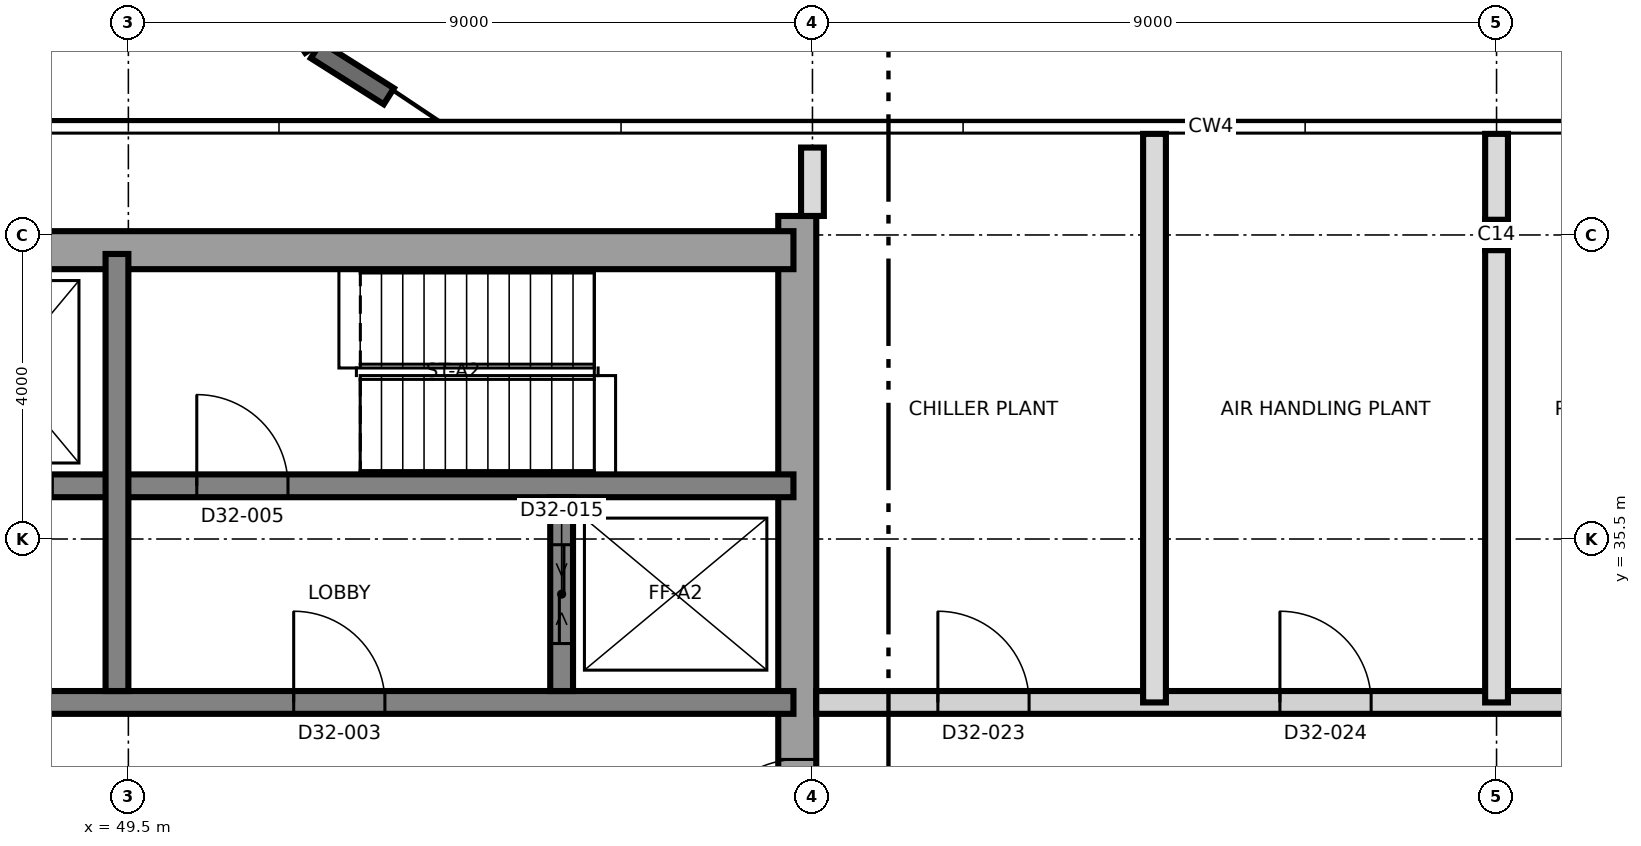
"""IFC4 building model, lengths in metres.
Left out: names, types, materials, properties, quantities, classifications, styles, units other than length and angle.
Written with IfcOpenShell. Run it as: python <this file> out.ifc"""

import sys

from ifc_helpers import new_model, si_unit, direction, frame, frame_2d, origin, origin_2d, place, context, subcontext, project, spatial, rectangle, i_section, extrude, element, fill, save


model = new_model("IFC4")
c1 = context("Model", 3, precision=1e-05, world=origin(), true_north=direction((0.0, 1.0)))
c2 = subcontext(c1, "Body", "Model", "MODEL_VIEW")
j1 = project(units=[si_unit("LENGTHUNIT", "METRE"), si_unit("PLANEANGLEUNIT", "RADIAN")], contexts=[c1])
p1 = place(None, origin())
s1 = spatial("IfcSite", under=j1, at=p1, CompositionType="ELEMENT")
p2 = place(p1, origin())
s2 = spatial("IfcBuilding", under=s1, at=p2, CompositionType="ELEMENT")
p3 = place(p2, frame((0.0, 0.0, 272.9)))
s3 = spatial("IfcBuildingStorey", under=s2, at=p3, CompositionType="ELEMENT", Elevation=272.9)
p4 = place(p3, frame((58.3, 21.25, 0.0), z_axis=(0.0, 0.0, 1.0), x_axis=(0.0, 1.0, 0.0)))
e1 = element("IfcWall", 1, at=p4, inside=s3, PredefinedType="SHEAR", context=c2, shape_type="SweptSolid", body=[
    extrude(rectangle(XDim=18.5, YDim=0.5, at=frame_2d((9.25, 0.0))), origin(), (0.0, 0.0, 1.0), 4.2),
])
p5 = place(p4, frame((10.15, 0.0, 0.0)))
e2 = element("IfcOpeningElement", 2, at=p5, cuts=e1, PredefinedType="OPENING", context=c2, shape_type="SweptSolid", body=[
    extrude(rectangle(XDim=1.2, YDim=2.1, at=frame_2d((0.6, 1.05))), frame((0.0, 0.26, 0.0), z_axis=(0.0, -1.0, 0.0), x_axis=(1.0, 0.0, 0.0)), (0.0, 0.0, 1.0), 0.52),
])
p6 = place(p3, frame((31.25, 39.3, 0.0), z_axis=(0.0, 0.0, 1.0), x_axis=(1.0, 0.0, 0.0)))
e3 = element("IfcWall", 3, at=p6, inside=s3, PredefinedType="SHEAR", context=c2, shape_type="SweptSolid", body=[
    extrude(rectangle(XDim=27.0, YDim=0.5, at=frame_2d((13.5, 0.0))), origin(), (0.0, 0.0, 1.0), 4.2),
])
p7 = place(p3, frame((31.75, 33.35, 0.0), z_axis=(0.0, 0.0, 1.0), x_axis=(1.0, 0.0, 0.0)))
e4 = element("IfcWall", 4, at=p7, inside=s3, PredefinedType="SHEAR", context=c2, shape_type="SweptSolid", body=[
    extrude(rectangle(XDim=26.5, YDim=0.3, at=frame_2d((13.25, 0.0))), origin(), (0.0, 0.0, 1.0), 4.2),
])
p8 = place(p7, frame((13.9, 0.0, 0.0)))
e5 = element("IfcOpeningElement", 5, at=p8, cuts=e4, PredefinedType="OPENING", context=c2, shape_type="SweptSolid", body=[
    extrude(rectangle(XDim=1.4, YDim=2.1, at=frame_2d((0.7, 1.05))), frame((0.0, 0.16, 0.0), z_axis=(0.0, -1.0, 0.0), x_axis=(1.0, 0.0, 0.0)), (0.0, 0.0, 1.0), 0.32),
])
p9 = place(p7, frame((5.375, 0.0, 0.0)))
e6 = element("IfcOpeningElement", 6, at=p9, cuts=e4, PredefinedType="OPENING", context=c2, shape_type="SweptSolid", body=[
    extrude(rectangle(XDim=1.2, YDim=2.1, at=frame_2d((0.6, 1.05))), frame((0.0, 0.16, 0.0), z_axis=(0.0, -1.0, 0.0), x_axis=(1.0, 0.0, 0.0)), (0.0, 0.0, 1.0), 0.32),
])
p10 = place(p7, frame((19.925, 0.0, 0.0)))
e7 = element("IfcOpeningElement", 7, at=p10, cuts=e4, PredefinedType="OPENING", context=c2, shape_type="SweptSolid", body=[
    extrude(rectangle(XDim=1.2, YDim=2.1, at=frame_2d((0.6, 1.05))), frame((0.0, 0.16, 0.0), z_axis=(0.0, -1.0, 0.0), x_axis=(1.0, 0.0, 0.0)), (0.0, 0.0, 1.0), 0.32),
])
p11 = place(p7, frame((9.8, 0.0, 0.0)))
e8 = element("IfcOpeningElement", 8, at=p11, cuts=e4, PredefinedType="OPENING", context=c2, shape_type="SweptSolid", body=[
    extrude(rectangle(XDim=0.9, YDim=2.1, at=frame_2d((0.45, 1.05))), frame((0.0, 0.16, 0.0), z_axis=(0.0, -1.0, 0.0), x_axis=(1.0, 0.0, 0.0)), (0.0, 0.0, 1.0), 0.32),
])
p12 = place(p3, frame((43.5, 36.2, 0.0), z_axis=(0.0, 0.0, 1.0), x_axis=(1.0, 0.0, 0.0)))
e9 = element("IfcWall", 9, at=p12, inside=s3, PredefinedType="SHEAR", context=c2, shape_type="SweptSolid", body=[
    extrude(rectangle(XDim=14.75, YDim=0.3, at=frame_2d((7.375, 0.0))), origin(), (0.0, 0.0, 1.0), 4.2),
])
p13 = place(p12, frame((6.9, 0.0, 0.0)))
e10 = element("IfcOpeningElement", 10, at=p13, cuts=e9, PredefinedType="OPENING", context=c2, shape_type="SweptSolid", body=[
    extrude(rectangle(XDim=1.2, YDim=2.1, at=frame_2d((0.6, 1.05))), frame((0.0, 0.16, 0.0), z_axis=(0.0, -1.0, 0.0), x_axis=(1.0, 0.0, 0.0)), (0.0, 0.0, 1.0), 0.32),
])
p14 = place(p12, frame((0.7, 0.0, 0.0)))
e11 = element("IfcOpeningElement", 11, at=p14, cuts=e9, PredefinedType="OPENING", context=c2, shape_type="SweptSolid", body=[
    extrude(rectangle(XDim=1.3, YDim=2.4, at=frame_2d((0.65, 1.2))), frame((0.0, 0.16, 0.0), z_axis=(0.0, -1.0, 0.0), x_axis=(1.0, 0.0, 0.0)), (0.0, 0.0, 1.0), 0.32),
])
p15 = place(p12, frame((3.7, 0.0, 0.0)))
e12 = element("IfcOpeningElement", 12, at=p15, cuts=e9, PredefinedType="OPENING", context=c2, shape_type="SweptSolid", body=[
    extrude(rectangle(XDim=1.3, YDim=2.4, at=frame_2d((0.65, 1.2))), frame((0.0, 0.16, 0.0), z_axis=(0.0, -1.0, 0.0), x_axis=(1.0, 0.0, 0.0)), (0.0, 0.0, 1.0), 0.32),
])
p16 = place(p3, frame((49.35, 33.5, 0.0), z_axis=(0.0, 0.0, 1.0), x_axis=(0.0, 1.0, 0.0)))
e13 = element("IfcWall", 13, at=p16, inside=s3, PredefinedType="SHEAR", context=c2, shape_type="SweptSolid", body=[
    extrude(rectangle(XDim=5.75, YDim=0.3, at=frame_2d((2.875, 0.0))), origin(), (0.0, 0.0, 1.0), 4.2),
])
p17 = place(p3, frame((55.2, 33.5, 0.0), z_axis=(0.0, 0.0, 1.0), x_axis=(0.0, 1.0, 0.0)))
e14 = element("IfcWall", 14, at=p17, inside=s3, PredefinedType="SHEAR", context=c2, shape_type="SweptSolid", body=[
    extrude(rectangle(XDim=2.55, YDim=0.3, at=frame_2d((1.275, 0.0))), origin(), (0.0, 0.0, 1.0), 4.2),
])
p18 = place(p17, frame((0.625, 0.0, 0.0)))
e15 = element("IfcOpeningElement", 15, at=p18, cuts=e14, PredefinedType="OPENING", context=c2, shape_type="SweptSolid", body=[
    extrude(rectangle(XDim=1.3, YDim=2.4, at=frame_2d((0.65, 1.2))), frame((0.0, 0.16, 0.0), z_axis=(0.0, -1.0, 0.0), x_axis=(1.0, 0.0, 0.0)), (0.0, 0.0, 1.0), 0.32),
])
p19 = place(p3, frame((67.5, 39.5, 0.0), z_axis=(0.0, 0.0, 1.0), x_axis=(1.0, 0.0, 0.0)))
e16 = element("IfcColumn", 16, at=p19, inside=s3, PredefinedType="COLUMN", context=c2, shape_type="SweptSolid", body=[
    extrude(i_section(OverallWidth=0.3, OverallDepth=0.4, WebThickness=0.013, FlangeThickness=0.024, FilletRadius=0.027, at=origin_2d()), origin(), (0.0, 0.0, 1.0), 4.2),
])
p20 = place(p3, frame((52.927, 41.325, 0.0), z_axis=(0.0, 0.0, 1.0), x_axis=(-0.845376374251, 0.53417112039, 0.0)))
e17 = element("IfcWall", 17, at=p20, inside=s3, PredefinedType="PARAPET", context=c2, shape_type="SweptSolid", body=[
    extrude(rectangle(XDim=1.134, YDim=0.25, at=frame_2d((0.567, 0.0))), origin(), (0.0, 0.0, 1.0), 0.6),
])
p21 = place(p3, frame((51.931, 41.966, 0.0), z_axis=(0.0, 0.0, 1.0), x_axis=(-0.555525106616, 0.83149976303, 0.0)))
e18 = element("IfcWall", 18, at=p21, inside=s3, PredefinedType="PARAPET", context=c2, shape_type="SweptSolid", body=[
    extrude(rectangle(XDim=1.912, YDim=0.25, at=frame_2d((0.956, 0.0))), origin(), (0.0, 0.0, 1.0), 0.6),
])
p22 = place(p3, frame((58.55, 33.35, 0.0), z_axis=(0.0, 0.0, 1.0), x_axis=(1.0, 0.0, 0.0)))
e19 = element("IfcWall", 19, at=p22, inside=s3, PredefinedType="PARTITIONING", context=c2, shape_type="SweptSolid", body=[
    extrude(rectangle(XDim=26.78, YDim=0.3, at=frame_2d((13.39, 0.0))), origin(), (0.0, 0.0, 1.0), 3.9),
])
p23 = place(p22, frame((1.6, 0.0, 0.0)))
e20 = element("IfcOpeningElement", 20, at=p23, cuts=e19, PredefinedType="OPENING", context=c2, shape_type="SweptSolid", body=[
    extrude(rectangle(XDim=1.2, YDim=2.1, at=frame_2d((0.6, 1.05))), frame((0.0, 0.16, 0.0), z_axis=(0.0, -1.0, 0.0), x_axis=(1.0, 0.0, 0.0)), (0.0, 0.0, 1.0), 0.32),
])
p24 = place(p22, frame((6.1, 0.0, 0.0)))
e21 = element("IfcOpeningElement", 21, at=p24, cuts=e19, PredefinedType="OPENING", context=c2, shape_type="SweptSolid", body=[
    extrude(rectangle(XDim=1.2, YDim=2.1, at=frame_2d((0.6, 1.05))), frame((0.0, 0.16, 0.0), z_axis=(0.0, -1.0, 0.0), x_axis=(1.0, 0.0, 0.0)), (0.0, 0.0, 1.0), 0.32),
])
p25 = place(p22, frame((10.6, 0.0, 0.0)))
e22 = element("IfcOpeningElement", 22, at=p25, cuts=e19, PredefinedType="OPENING", context=c2, shape_type="SweptSolid", body=[
    extrude(rectangle(XDim=1.2, YDim=2.1, at=frame_2d((0.6, 1.05))), frame((0.0, 0.16, 0.0), z_axis=(0.0, -1.0, 0.0), x_axis=(1.0, 0.0, 0.0)), (0.0, 0.0, 1.0), 0.32),
])
p26 = place(p22, frame((15.1, 0.0, 0.0)))
e23 = element("IfcOpeningElement", 23, at=p26, cuts=e19, PredefinedType="OPENING", context=c2, shape_type="SweptSolid", body=[
    extrude(rectangle(XDim=1.2, YDim=2.1, at=frame_2d((0.6, 1.05))), frame((0.0, 0.16, 0.0), z_axis=(0.0, -1.0, 0.0), x_axis=(1.0, 0.0, 0.0)), (0.0, 0.0, 1.0), 0.32),
])
p27 = place(p22, frame((19.6, 0.0, 0.0)))
e24 = element("IfcOpeningElement", 24, at=p27, cuts=e19, PredefinedType="OPENING", context=c2, shape_type="SweptSolid", body=[
    extrude(rectangle(XDim=1.2, YDim=2.1, at=frame_2d((0.6, 1.05))), frame((0.0, 0.16, 0.0), z_axis=(0.0, -1.0, 0.0), x_axis=(1.0, 0.0, 0.0)), (0.0, 0.0, 1.0), 0.32),
])
p28 = place(p22, frame((24.1, 0.0, 0.0)))
e25 = element("IfcOpeningElement", 25, at=p28, cuts=e19, PredefinedType="OPENING", context=c2, shape_type="SweptSolid", body=[
    extrude(rectangle(XDim=1.2, YDim=2.1, at=frame_2d((0.6, 1.05))), frame((0.0, 0.16, 0.0), z_axis=(0.0, -1.0, 0.0), x_axis=(1.0, 0.0, 0.0)), (0.0, 0.0, 1.0), 0.32),
])
p29 = place(p3, frame((58.5, 39.75, 0.0), z_axis=(0.0, 0.0, 1.0), x_axis=(0.0, 1.0, 0.0)))
e26 = element("IfcWall", 26, at=p29, inside=s3, PredefinedType="PARTITIONING", context=c2, shape_type="SweptSolid", body=[
    extrude(rectangle(XDim=0.9, YDim=0.3, at=frame_2d((0.45, 0.0))), origin(), (0.0, 0.0, 1.0), 3.9),
])
for number, where, z_axis, x_axis in (
    (27, (63.0, 33.35, 0.0), (0.0, 0.0, 1.0), (0.0, 1.0, 0.0)),
    (28, (67.5, 33.35, 0.0), (0.0, 0.0, 1.0), (0.0, 1.0, 0.0)),
):
    element("IfcWall", number, at=place(p3, frame(where, z_axis=z_axis, x_axis=x_axis)), inside=s3, PredefinedType="PARTITIONING", context=c2, shape_type="SweptSolid", body=[
        extrude(rectangle(XDim=7.48, YDim=0.3, at=frame_2d((3.74, 0.0))), origin(), (0.0, 0.0, 1.0), 3.9),
    ])
p30 = place(p10, origin())
e29 = element("IfcDoor", 29, at=p30, inside=s3, OperationType="SINGLE_SWING_RIGHT", PredefinedType="DOOR", context=c2, shape_type="SweptSolid", body=[
    extrude(rectangle(XDim=1.2, YDim=2.1, at=frame_2d((0.6, 1.05))), frame((0.0, 0.025, 0.0), z_axis=(0.0, -1.0, 0.0), x_axis=(1.0, 0.0, 0.0)), (0.0, 0.0, 1.0), 0.05),
])
fill(e7, e29)
p31 = place(p13, origin())
e30 = element("IfcDoor", 30, at=p31, inside=s3, OperationType="SINGLE_SWING_LEFT", PredefinedType="DOOR", context=c2, shape_type="SweptSolid", body=[
    extrude(rectangle(XDim=1.2, YDim=2.1, at=frame_2d((0.6, 1.05))), frame((0.0, 0.025, 0.0), z_axis=(0.0, -1.0, 0.0), x_axis=(1.0, 0.0, 0.0)), (0.0, 0.0, 1.0), 0.05),
])
fill(e10, e30)
p32 = place(p5, origin())
e31 = element("IfcDoor", 31, at=p32, inside=s3, OperationType="SINGLE_SWING_LEFT", PredefinedType="DOOR", context=c2, shape_type="SweptSolid", body=[
    extrude(rectangle(XDim=1.2, YDim=2.1, at=frame_2d((0.6, 1.05))), frame((0.0, 0.025, 0.0), z_axis=(0.0, -1.0, 0.0), x_axis=(1.0, 0.0, 0.0)), (0.0, 0.0, 1.0), 0.05),
])
fill(e2, e31)
p33 = place(p18, origin())
e32 = element("IfcDoor", 32, at=p33, inside=s3, OperationType="SLIDING_TO_LEFT", PredefinedType="DOOR", context=c2, shape_type="SweptSolid", body=[
    extrude(rectangle(XDim=1.3, YDim=2.4, at=frame_2d((0.65, 1.2))), frame((0.0, 0.025, 0.0), z_axis=(0.0, -1.0, 0.0), x_axis=(1.0, 0.0, 0.0)), (0.0, 0.0, 1.0), 0.05),
])
fill(e15, e32)
p34 = place(p23, origin())
e33 = element("IfcDoor", 33, at=p34, inside=s3, OperationType="SINGLE_SWING_LEFT", PredefinedType="DOOR", context=c2, shape_type="SweptSolid", body=[
    extrude(rectangle(XDim=1.2, YDim=2.1, at=frame_2d((0.6, 1.05))), frame((0.0, 0.025, 0.0), z_axis=(0.0, -1.0, 0.0), x_axis=(1.0, 0.0, 0.0)), (0.0, 0.0, 1.0), 0.05),
])
fill(e20, e33)
p35 = place(p24, origin())
e34 = element("IfcDoor", 34, at=p35, inside=s3, OperationType="SINGLE_SWING_LEFT", PredefinedType="DOOR", context=c2, shape_type="SweptSolid", body=[
    extrude(rectangle(XDim=1.2, YDim=2.1, at=frame_2d((0.6, 1.05))), frame((0.0, 0.025, 0.0), z_axis=(0.0, -1.0, 0.0), x_axis=(1.0, 0.0, 0.0)), (0.0, 0.0, 1.0), 0.05),
])
fill(e21, e34)
save(model, sys.argv[1])
